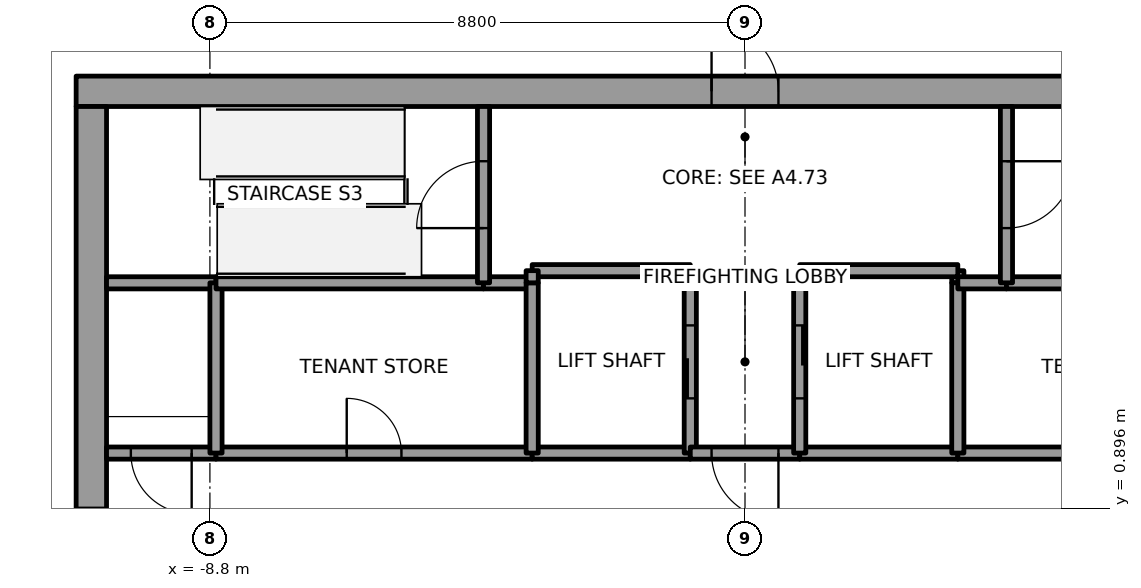
"""IFC4 building model, lengths in metres.
Left out: names, types, materials, properties, quantities, classifications, styles, units other than length and angle.
Written with IfcOpenShell. Run it as: python <this file> out.ifc"""

import sys

from ifc_helpers import new_model, si_unit, direction, frame, frame_2d, origin, place, context, subcontext, project, spatial, rectangle, extrude, element, fill, save


model = new_model("IFC4")
c1 = context("Model", 3, precision=1e-05, world=origin(), true_north=direction((0.0, 1.0)))
c2 = subcontext(c1, "Body", "Model", "MODEL_VIEW")
j1 = project(units=[si_unit("LENGTHUNIT", "METRE"), si_unit("PLANEANGLEUNIT", "RADIAN")], contexts=[c1])
p1 = place(None, origin())
s1 = spatial("IfcSite", under=j1, at=p1, CompositionType="ELEMENT")
p2 = place(p1, origin())
s2 = spatial("IfcBuilding", under=s1, at=p2, CompositionType="ELEMENT")
p3 = place(p2, frame((0.0, 0.0, 311.0)))
s3 = spatial("IfcBuildingStorey", under=s2, at=p3, CompositionType="ELEMENT", Elevation=311.0)
p4 = place(p3, frame((-11.0, 7.75, 0.0), z_axis=(0.0, 0.0, 1.0), x_axis=(1.0, 0.0, 0.0)))
e1 = element("IfcWall", 1, at=p4, inside=s3, PredefinedType="SHEAR", context=c2, shape_type="SweptSolid", body=[
    extrude(rectangle(XDim=22.0, YDim=0.5, at=frame_2d((11.0, 0.0))), origin(), (0.0, 0.0, 1.0), 4.0),
])
p5 = place(p4, frame((10.45, 0.0, 0.0)))
e2 = element("IfcOpeningElement", 2, at=p5, cuts=e1, PredefinedType="OPENING", context=c2, shape_type="SweptSolid", body=[
    extrude(rectangle(XDim=1.1, YDim=2.1, at=frame_2d((0.55, 1.05))), frame((0.0, 0.25, 0.0), z_axis=(0.0, -1.0, 0.0), x_axis=(1.0, 0.0, 0.0)), (0.0, 0.0, 1.0), 0.5),
])
p6 = place(p3, frame((-10.75, -7.5, 0.0), z_axis=(0.0, 0.0, 1.0), x_axis=(0.0, 1.0, 0.0)))
e3 = element("IfcWall", 3, at=p6, inside=s3, PredefinedType="SHEAR", context=c2, shape_type="SweptSolid", body=[
    extrude(rectangle(XDim=15.0, YDim=0.5, at=frame_2d((7.5, 0.0))), origin(), (0.0, 0.0, 1.0), 4.0),
])
p7 = place(p6, frame((6.6, 0.0, 0.0)))
e4 = element("IfcOpeningElement", 4, at=p7, cuts=e3, PredefinedType="OPENING", context=c2, shape_type="SweptSolid", body=[
    extrude(rectangle(XDim=1.8, YDim=2.1, at=frame_2d((0.9, 1.05))), frame((0.0, 0.25, 0.0), z_axis=(0.0, -1.0, 0.0), x_axis=(1.0, 0.0, 0.0)), (0.0, 0.0, 1.0), 0.5),
])
p8 = place(p3, frame((-8.7, 1.8, 0.0), z_axis=(0.0, 0.0, 1.0), x_axis=(-1.0, 0.0, 0.0)))
e5 = element("IfcWall", 5, at=p8, inside=s3, PredefinedType="SOLIDWALL", context=c2, shape_type="SweptSolid", body=[
    extrude(rectangle(XDim=1.8, YDim=0.2, at=frame_2d((0.9, 0.0))), origin(), (0.0, 0.0, 1.0), 3.85),
])
p9 = place(p8, frame((0.4, 0.0, 0.0)))
e6 = element("IfcOpeningElement", 6, at=p9, cuts=e5, PredefinedType="OPENING", context=c2, shape_type="SweptSolid", body=[
    extrude(rectangle(XDim=1.0, YDim=2.1, at=frame_2d((0.5, 1.05))), frame((0.0, 0.1, 0.0), z_axis=(0.0, -1.0, 0.0), x_axis=(1.0, 0.0, 0.0)), (0.0, 0.0, 1.0), 0.2),
])
p10 = place(p3, frame((-8.7, 4.6, 0.0), z_axis=(0.0, 0.0, 1.0), x_axis=(-1.0, 0.0, 0.0)))
e7 = element("IfcWall", 7, at=p10, inside=s3, PredefinedType="SOLIDWALL", context=c2, shape_type="SweptSolid", body=[
    extrude(rectangle(XDim=1.8, YDim=0.2, at=frame_2d((0.9, 0.0))), origin(), (0.0, 0.0, 1.0), 3.85),
])
p11 = place(p3, frame((-8.7, 1.8, 0.0), z_axis=(0.0, 0.0, 1.0), x_axis=(1.0, 0.0, 0.0)))
e8 = element("IfcWall", 8, at=p11, inside=s3, PredefinedType="SOLIDWALL", context=c2, shape_type="SweptSolid", body=[
    extrude(rectangle(XDim=5.2, YDim=0.2, at=frame_2d((2.6, 0.0))), origin(), (0.0, 0.0, 1.0), 3.85),
])
p12 = place(p11, frame((2.15, 0.0, 0.0)))
e9 = element("IfcOpeningElement", 9, at=p12, cuts=e8, PredefinedType="OPENING", context=c2, shape_type="SweptSolid", body=[
    extrude(rectangle(XDim=0.9, YDim=2.1, at=frame_2d((0.45, 1.05))), frame((0.0, 0.1, 0.0), z_axis=(0.0, -1.0, 0.0), x_axis=(1.0, 0.0, 0.0)), (0.0, 0.0, 1.0), 0.2),
])
p13 = place(p3, frame((-8.7, 4.6, 0.0), z_axis=(0.0, 0.0, 1.0), x_axis=(0.0, -1.0, 0.0)))
e10 = element("IfcWall", 10, at=p13, inside=s3, PredefinedType="SOLIDWALL", context=c2, shape_type="SweptSolid", body=[
    extrude(rectangle(XDim=2.8, YDim=0.2, at=frame_2d((1.4, 0.0))), origin(), (0.0, 0.0, 1.0), 3.85),
])
p14 = place(p3, frame((-4.3, 4.6, 0.0), z_axis=(0.0, 0.0, 1.0), x_axis=(-1.0, 0.0, 0.0)))
e11 = element("IfcWall", 11, at=p14, inside=s3, PredefinedType="SOLIDWALL", context=c2, shape_type="SweptSolid", body=[
    extrude(rectangle(XDim=4.4, YDim=0.2, at=frame_2d((2.2, 0.0))), origin(), (0.0, 0.0, 1.0), 3.85),
])
p15 = place(p3, frame((-3.5, 4.6, 0.0), z_axis=(0.0, 0.0, 1.0), x_axis=(-1.0, 0.0, 0.0)))
e12 = element("IfcWall", 12, at=p15, inside=s3, PredefinedType="SOLIDWALL", context=c2, shape_type="SweptSolid", body=[
    extrude(rectangle(XDim=0.8, YDim=0.2, at=frame_2d((0.4, 0.0))), origin(), (0.0, 0.0, 1.0), 3.85),
])
p16 = place(p3, frame((-4.3, 4.6, 0.0), z_axis=(0.0, 0.0, 1.0), x_axis=(0.0, 1.0, 0.0)))
e13 = element("IfcWall", 13, at=p16, inside=s3, PredefinedType="SOLIDWALL", context=c2, shape_type="SweptSolid", body=[
    extrude(rectangle(XDim=2.9, YDim=0.2, at=frame_2d((1.45, 0.0))), origin(), (0.0, 0.0, 1.0), 3.85),
])
p17 = place(p16, frame((0.9, 0.0, 0.0)))
e14 = element("IfcOpeningElement", 14, at=p17, cuts=e13, PredefinedType="OPENING", context=c2, shape_type="SweptSolid", body=[
    extrude(rectangle(XDim=1.1, YDim=2.1, at=frame_2d((0.55, 1.05))), frame((0.0, 0.1, 0.0), z_axis=(0.0, -1.0, 0.0), x_axis=(1.0, 0.0, 0.0)), (0.0, 0.0, 1.0), 0.2),
])
p18 = place(p3, frame((-0.9, 1.8, 0.0), z_axis=(0.0, 0.0, 1.0), x_axis=(-1.0, 0.0, 0.0)))
e15 = element("IfcWall", 15, at=p18, inside=s3, PredefinedType="SOLIDWALL", context=c2, shape_type="SweptSolid", body=[
    extrude(rectangle(XDim=2.6, YDim=0.2, at=frame_2d((1.3, 0.0))), origin(), (0.0, 0.0, 1.0), 3.85),
])
p19 = place(p3, frame((-3.5, 1.8, 0.0), z_axis=(0.0, 0.0, 1.0), x_axis=(0.0, 1.0, 0.0)))
e16 = element("IfcWall", 16, at=p19, inside=s3, PredefinedType="SOLIDWALL", context=c2, shape_type="SweptSolid", body=[
    extrude(rectangle(XDim=2.8, YDim=0.2, at=frame_2d((1.4, 0.0))), origin(), (0.0, 0.0, 1.0), 3.85),
])
p20 = place(p3, frame((-0.9, 1.8, 0.0), z_axis=(0.0, 0.0, 1.0), x_axis=(0.0, 1.0, 0.0)))
e17 = element("IfcWall", 17, at=p20, inside=s3, PredefinedType="SOLIDWALL", context=c2, shape_type="SweptSolid", body=[
    extrude(rectangle(XDim=3.0, YDim=0.2, at=frame_2d((1.5, 0.0))), origin(), (0.0, 0.0, 1.0), 3.85),
])
p21 = place(p20, frame((0.9, 0.0, 0.0)))
e18 = element("IfcOpeningElement", 18, at=p21, cuts=e17, PredefinedType="OPENING", context=c2, shape_type="SweptSolid", body=[
    extrude(rectangle(XDim=1.2, YDim=2.1, at=frame_2d((0.6, 1.05))), frame((0.0, 0.1, 0.0), z_axis=(0.0, -1.0, 0.0), x_axis=(1.0, 0.0, 0.0)), (0.0, 0.0, 1.0), 0.2),
])
p22 = place(p3, frame((-0.9, 4.8, 0.0), z_axis=(0.0, 0.0, 1.0), x_axis=(-1.0, 0.0, 0.0)))
e19 = element("IfcWall", 19, at=p22, inside=s3, PredefinedType="SOLIDWALL", context=c2, shape_type="SweptSolid", body=[
    extrude(rectangle(XDim=2.6, YDim=0.2, at=frame_2d((1.3, 0.0))), origin(), (0.0, 0.0, 1.0), 3.85),
])
p23 = place(p3, frame((-3.5, 4.8, 0.0), z_axis=(0.0, 0.0, 1.0), x_axis=(0.0, -1.0, 0.0)))
e20 = element("IfcWall", 20, at=p23, inside=s3, PredefinedType="SOLIDWALL", context=c2, shape_type="SweptSolid", body=[
    extrude(rectangle(XDim=0.2, YDim=0.2, at=frame_2d((0.1, 0.0))), origin(), (0.0, 0.0, 1.0), 3.85),
])
p24 = place(p3, frame((0.9, 1.8, 0.0), z_axis=(0.0, 0.0, 1.0), x_axis=(-1.0, 0.0, 0.0)))
e21 = element("IfcWall", 21, at=p24, inside=s3, PredefinedType="SOLIDWALL", context=c2, shape_type="SweptSolid", body=[
    extrude(rectangle(XDim=1.8, YDim=0.2, at=frame_2d((0.9, 0.0))), origin(), (0.0, 0.0, 1.0), 3.85),
])
p25 = place(p24, frame((0.35, 0.0, 0.0)))
e22 = element("IfcOpeningElement", 22, at=p25, cuts=e21, PredefinedType="OPENING", context=c2, shape_type="SweptSolid", body=[
    extrude(rectangle(XDim=1.1, YDim=2.1, at=frame_2d((0.55, 1.05))), frame((0.0, 0.1, 0.0), z_axis=(0.0, -1.0, 0.0), x_axis=(1.0, 0.0, 0.0)), (0.0, 0.0, 1.0), 0.2),
])
p26 = place(p3, frame((3.5, 1.8, 0.0), z_axis=(0.0, 0.0, 1.0), x_axis=(-1.0, 0.0, 0.0)))
e23 = element("IfcWall", 23, at=p26, inside=s3, PredefinedType="SOLIDWALL", context=c2, shape_type="SweptSolid", body=[
    extrude(rectangle(XDim=2.6, YDim=0.2, at=frame_2d((1.3, 0.0))), origin(), (0.0, 0.0, 1.0), 3.85),
])
p27 = place(p3, frame((3.5, 4.6, 0.0), z_axis=(0.0, 0.0, 1.0), x_axis=(0.0, 1.0, 0.0)))
e24 = element("IfcWall", 24, at=p27, inside=s3, PredefinedType="SOLIDWALL", context=c2, shape_type="SweptSolid", body=[
    extrude(rectangle(XDim=0.2, YDim=0.2, at=frame_2d((0.1, 0.0))), origin(), (0.0, 0.0, 1.0), 3.85),
])
p28 = place(p3, frame((3.5, 4.8, 0.0), z_axis=(0.0, 0.0, 1.0), x_axis=(-1.0, 0.0, 0.0)))
e25 = element("IfcWall", 25, at=p28, inside=s3, PredefinedType="SOLIDWALL", context=c2, shape_type="SweptSolid", body=[
    extrude(rectangle(XDim=2.6, YDim=0.2, at=frame_2d((1.3, 0.0))), origin(), (0.0, 0.0, 1.0), 3.85),
])
p29 = place(p3, frame((0.9, 4.8, 0.0), z_axis=(0.0, 0.0, 1.0), x_axis=(0.0, -1.0, 0.0)))
e26 = element("IfcWall", 26, at=p29, inside=s3, PredefinedType="SOLIDWALL", context=c2, shape_type="SweptSolid", body=[
    extrude(rectangle(XDim=3.0, YDim=0.2, at=frame_2d((1.5, 0.0))), origin(), (0.0, 0.0, 1.0), 3.85),
])
p30 = place(p29, frame((0.9, 0.0, 0.0)))
e27 = element("IfcOpeningElement", 27, at=p30, cuts=e26, PredefinedType="OPENING", context=c2, shape_type="SweptSolid", body=[
    extrude(rectangle(XDim=1.2, YDim=2.1, at=frame_2d((0.6, 1.05))), frame((0.0, 0.1, 0.0), z_axis=(0.0, -1.0, 0.0), x_axis=(1.0, 0.0, 0.0)), (0.0, 0.0, 1.0), 0.2),
])
p31 = place(p3, frame((3.5, 1.8, 0.0), z_axis=(0.0, 0.0, 1.0), x_axis=(1.0, 0.0, 0.0)))
e28 = element("IfcWall", 28, at=p31, inside=s3, PredefinedType="SOLIDWALL", context=c2, shape_type="SweptSolid", body=[
    extrude(rectangle(XDim=5.2, YDim=0.2, at=frame_2d((2.6, 0.0))), origin(), (0.0, 0.0, 1.0), 3.85),
])
p32 = place(p31, frame((2.15, 0.0, 0.0)))
e29 = element("IfcOpeningElement", 29, at=p32, cuts=e28, PredefinedType="OPENING", context=c2, shape_type="SweptSolid", body=[
    extrude(rectangle(XDim=0.9, YDim=2.1, at=frame_2d((0.45, 1.05))), frame((0.0, 0.1, 0.0), z_axis=(0.0, -1.0, 0.0), x_axis=(1.0, 0.0, 0.0)), (0.0, 0.0, 1.0), 0.2),
])
p33 = place(p3, frame((3.5, 4.6, 0.0), z_axis=(0.0, 0.0, 1.0), x_axis=(0.0, -1.0, 0.0)))
e30 = element("IfcWall", 30, at=p33, inside=s3, PredefinedType="SOLIDWALL", context=c2, shape_type="SweptSolid", body=[
    extrude(rectangle(XDim=2.8, YDim=0.2, at=frame_2d((1.4, 0.0))), origin(), (0.0, 0.0, 1.0), 3.85),
])
p34 = place(p3, frame((4.3, 4.6, 0.0), z_axis=(0.0, 0.0, 1.0), x_axis=(-1.0, 0.0, 0.0)))
e31 = element("IfcWall", 31, at=p34, inside=s3, PredefinedType="SOLIDWALL", context=c2, shape_type="SweptSolid", body=[
    extrude(rectangle(XDim=0.8, YDim=0.2, at=frame_2d((0.4, 0.0))), origin(), (0.0, 0.0, 1.0), 3.85),
])
p35 = place(p3, frame((8.7, 4.6, 0.0), z_axis=(0.0, 0.0, 1.0), x_axis=(-1.0, 0.0, 0.0)))
e32 = element("IfcWall", 32, at=p35, inside=s3, PredefinedType="SOLIDWALL", context=c2, shape_type="SweptSolid", body=[
    extrude(rectangle(XDim=4.4, YDim=0.2, at=frame_2d((2.2, 0.0))), origin(), (0.0, 0.0, 1.0), 3.85),
])
p36 = place(p3, frame((4.3, 7.5, 0.0), z_axis=(0.0, 0.0, 1.0), x_axis=(0.0, -1.0, 0.0)))
e33 = element("IfcWall", 33, at=p36, inside=s3, PredefinedType="SOLIDWALL", context=c2, shape_type="SweptSolid", body=[
    extrude(rectangle(XDim=2.9, YDim=0.2, at=frame_2d((1.45, 0.0))), origin(), (0.0, 0.0, 1.0), 3.85),
])
p37 = place(p36, frame((0.9, 0.0, 0.0)))
e34 = element("IfcOpeningElement", 34, at=p37, cuts=e33, PredefinedType="OPENING", context=c2, shape_type="SweptSolid", body=[
    extrude(rectangle(XDim=1.1, YDim=2.1, at=frame_2d((0.55, 1.05))), frame((0.0, 0.1, 0.0), z_axis=(0.0, -1.0, 0.0), x_axis=(1.0, 0.0, 0.0)), (0.0, 0.0, 1.0), 0.2),
])
p38 = place(p21, origin())
e35 = element("IfcDoor", 35, at=p38, inside=s3, OperationType="SLIDING_TO_LEFT", PredefinedType="DOOR", context=c2, shape_type="SweptSolid", body=[
    extrude(rectangle(XDim=1.2, YDim=2.1, at=frame_2d((0.6, 1.05))), frame((0.0, 0.025, 0.0), z_axis=(0.0, -1.0, 0.0), x_axis=(1.0, 0.0, 0.0)), (0.0, 0.0, 1.0), 0.05),
])
fill(e18, e35)
p39 = place(p30, origin())
e36 = element("IfcDoor", 36, at=p39, inside=s3, OperationType="SLIDING_TO_LEFT", PredefinedType="DOOR", context=c2, shape_type="SweptSolid", body=[
    extrude(rectangle(XDim=1.2, YDim=2.1, at=frame_2d((0.6, 1.05))), frame((0.0, 0.025, 0.0), z_axis=(0.0, -1.0, 0.0), x_axis=(1.0, 0.0, 0.0)), (0.0, 0.0, 1.0), 0.05),
])
fill(e27, e36)
p40 = place(p25, origin())
e37 = element("IfcDoor", 37, at=p40, inside=s3, OperationType="SINGLE_SWING_LEFT", PredefinedType="DOOR", context=c2, shape_type="SweptSolid", body=[
    extrude(rectangle(XDim=1.1, YDim=2.1, at=frame_2d((0.55, 1.05))), frame((0.0, 0.025, 0.0), z_axis=(0.0, -1.0, 0.0), x_axis=(1.0, 0.0, 0.0)), (0.0, 0.0, 1.0), 0.05),
])
fill(e22, e37)
p41 = place(p9, origin())
e38 = element("IfcDoor", 38, at=p41, inside=s3, OperationType="SINGLE_SWING_LEFT", PredefinedType="DOOR", context=c2, shape_type="SweptSolid", body=[
    extrude(rectangle(XDim=1.0, YDim=2.1, at=frame_2d((0.5, 1.05))), frame((0.0, 0.025, 0.0), z_axis=(0.0, -1.0, 0.0), x_axis=(1.0, 0.0, 0.0)), (0.0, 0.0, 1.0), 0.05),
])
fill(e6, e38)
p42 = place(p17, origin())
e39 = element("IfcDoor", 39, at=p42, inside=s3, OperationType="SINGLE_SWING_LEFT", PredefinedType="DOOR", context=c2, shape_type="SweptSolid", body=[
    extrude(rectangle(XDim=1.1, YDim=2.1, at=frame_2d((0.55, 1.05))), frame((0.0, 0.025, 0.0), z_axis=(0.0, -1.0, 0.0), x_axis=(1.0, 0.0, 0.0)), (0.0, 0.0, 1.0), 0.05),
])
fill(e14, e39)
p43 = place(p37, origin())
e40 = element("IfcDoor", 40, at=p43, inside=s3, OperationType="SINGLE_SWING_LEFT", PredefinedType="DOOR", context=c2, shape_type="SweptSolid", body=[
    extrude(rectangle(XDim=1.1, YDim=2.1, at=frame_2d((0.55, 1.05))), frame((0.0, 0.025, 0.0), z_axis=(0.0, -1.0, 0.0), x_axis=(1.0, 0.0, 0.0)), (0.0, 0.0, 1.0), 0.05),
])
fill(e34, e40)
p44 = place(p12, origin())
e41 = element("IfcDoor", 41, at=p44, inside=s3, OperationType="SINGLE_SWING_LEFT", PredefinedType="DOOR", context=c2, shape_type="SweptSolid", body=[
    extrude(rectangle(XDim=0.9, YDim=2.1, at=frame_2d((0.45, 1.05))), frame((0.0, 0.025, 0.0), z_axis=(0.0, -1.0, 0.0), x_axis=(1.0, 0.0, 0.0)), (0.0, 0.0, 1.0), 0.05),
])
fill(e9, e41)
p45 = place(p7, origin())
e42 = element("IfcDoor", 42, at=p45, inside=s3, OperationType="DOUBLE_DOOR_SINGLE_SWING", PredefinedType="DOOR", context=c2, shape_type="SweptSolid", body=[
    extrude(rectangle(XDim=1.8, YDim=2.1, at=frame_2d((0.9, 1.05))), frame((0.0, 0.025, 0.0), z_axis=(0.0, -1.0, 0.0), x_axis=(1.0, 0.0, 0.0)), (0.0, 0.0, 1.0), 0.05),
])
fill(e4, e42)
p46 = place(p5, origin())
e43 = element("IfcDoor", 43, at=p46, inside=s3, OperationType="SINGLE_SWING_LEFT", PredefinedType="DOOR", context=c2, shape_type="SweptSolid", body=[
    extrude(rectangle(XDim=1.1, YDim=2.1, at=frame_2d((0.55, 1.05))), frame((0.0, 0.025, 0.0), z_axis=(0.0, -1.0, 0.0), x_axis=(1.0, 0.0, 0.0)), (0.0, 0.0, 1.0), 0.05),
])
fill(e2, e43)
save(model, sys.argv[1])
